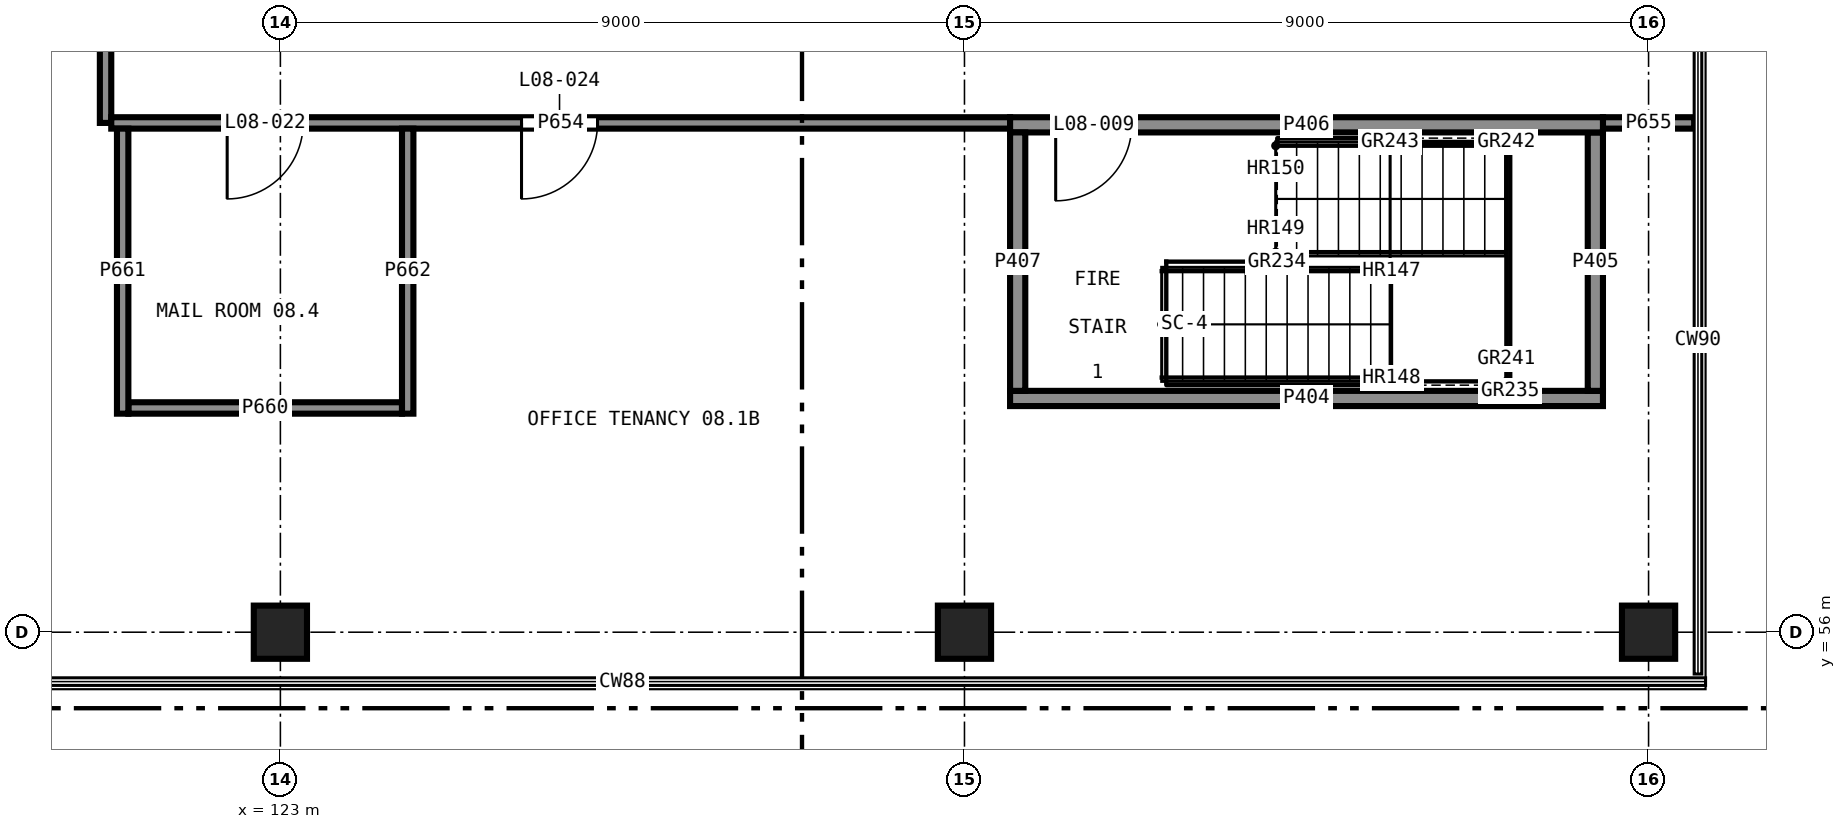
"""IFC4 building model, lengths in metres.
Left out: names, types, materials, properties, quantities, classifications, styles, units other than length and angle.
Written with IfcOpenShell. Run it as: python <this file> out.ifc"""

import sys

from ifc_helpers import new_model, si_unit, direction, frame, frame_2d, origin, origin_2d, place, context, subcontext, project, spatial, rectangle, extrude, element, fill, save


model = new_model("IFC4")
c1 = context("Model", 3, precision=1e-05, world=origin(), true_north=direction((0.0, 1.0)))
c2 = subcontext(c1, "Body", "Model", "MODEL_VIEW")
j1 = project(units=[si_unit("LENGTHUNIT", "METRE"), si_unit("PLANEANGLEUNIT", "RADIAN")], contexts=[c1])
p1 = place(None, origin())
s1 = spatial("IfcSite", under=j1, at=p1, CompositionType="ELEMENT")
p2 = place(p1, origin())
s2 = spatial("IfcBuilding", under=s1, at=p2, CompositionType="ELEMENT")
p3 = place(p2, frame((0.0, 0.0, 33.5)))
s3 = spatial("IfcBuildingStorey", under=s2, at=p3, CompositionType="ELEMENT", Elevation=33.5)
for number, where, z_axis, x_axis in (
    (1, (123.0, 56.0, 0.0), (0.0, 0.0, 1.0), (1.0, 0.0, 0.0)),
    (2, (132.0, 56.0, 0.0), (0.0, 0.0, 1.0), (1.0, 0.0, 0.0)),
    (3, (141.0, 56.0, 0.0), (0.0, 0.0, 1.0), (1.0, 0.0, 0.0)),
):
    element("IfcColumn", number, at=place(p3, frame(where, z_axis=z_axis, x_axis=x_axis)), inside=s3, PredefinedType="COLUMN", context=c2, shape_type="SweptSolid", body=[
        extrude(rectangle(XDim=0.7, YDim=0.7, at=origin_2d()), origin(), (0.0, 0.0, 1.0), 4.0),
    ])
p4 = place(p3, frame((132.6, 59.075, 0.0), z_axis=(0.0, 0.0, 1.0), x_axis=(1.0, 0.0, 0.0)))
e4 = element("IfcWall", 4, at=p4, inside=s3, PredefinedType="SHEAR", context=c2, shape_type="SweptSolid", body=[
    extrude(rectangle(XDim=7.8, YDim=0.2, at=frame_2d((3.9, 0.0))), origin(), (0.0, 0.0, 1.0), 3.75),
])
p5 = place(p3, frame((140.3, 59.175, 0.0), z_axis=(0.0, 0.0, 1.0), x_axis=(0.0, 1.0, 0.0)))
e5 = element("IfcWall", 5, at=p5, inside=s3, PredefinedType="SHEAR", context=c2, shape_type="SweptSolid", body=[
    extrude(rectangle(XDim=3.4, YDim=0.2, at=frame_2d((1.7, 0.0))), origin(), (0.0, 0.0, 1.0), 3.75),
])
p6 = place(p3, frame((140.4, 62.675, 0.0), z_axis=(0.0, 0.0, 1.0), x_axis=(-1.0, 0.0, 0.0)))
e6 = element("IfcWall", 6, at=p6, inside=s3, PredefinedType="SHEAR", context=c2, shape_type="SweptSolid", body=[
    extrude(rectangle(XDim=7.8, YDim=0.2, at=frame_2d((3.9, 0.0))), origin(), (0.0, 0.0, 1.0), 3.75),
])
p7 = place(p6, frame((6.2, 0.0, 0.0)))
e7 = element("IfcOpeningElement", 7, at=p7, cuts=e6, PredefinedType="OPENING", context=c2, shape_type="SweptSolid", body=[
    extrude(rectangle(XDim=1.0, YDim=2.1, at=frame_2d((0.5, 1.05))), frame((0.0, 0.11, 0.0), z_axis=(0.0, -1.0, 0.0), x_axis=(1.0, 0.0, 0.0)), (0.0, 0.0, 1.0), 0.22),
])
p8 = place(p3, frame((132.7, 62.575, 0.0), z_axis=(0.0, 0.0, 1.0), x_axis=(0.0, -1.0, 0.0)))
e8 = element("IfcWall", 8, at=p8, inside=s3, PredefinedType="SHEAR", context=c2, shape_type="SweptSolid", body=[
    extrude(rectangle(XDim=3.4, YDim=0.2, at=frame_2d((1.7, 0.0))), origin(), (0.0, 0.0, 1.0), 3.75),
])
p9 = place(p3, frame((120.7, 62.7, 0.0), z_axis=(0.0, 0.0, 1.0), x_axis=(0.0, 1.0, 0.0)))
e9 = element("IfcWall", 9, at=p9, inside=s3, PredefinedType="PARTITIONING", context=c2, shape_type="SweptSolid", body=[
    extrude(rectangle(XDim=22.525, YDim=0.15, at=frame_2d((11.263, 0.0))), origin(), (0.0, 0.0, 1.0), 3.75),
])
p10 = place(p9, frame((16.435, 0.0, 0.0)))
e10 = element("IfcOpeningElement", 10, at=p10, cuts=e9, PredefinedType="OPENING", context=c2, shape_type="SweptSolid", body=[
    extrude(rectangle(XDim=1.0, YDim=2.1, at=frame_2d((0.5, 1.05))), frame((0.0, 0.085, 0.0), z_axis=(0.0, -1.0, 0.0), x_axis=(1.0, 0.0, 0.0)), (0.0, 0.0, 1.0), 0.17),
])
p11 = place(p3, frame((132.6, 62.7, 0.0), z_axis=(0.0, 0.0, 1.0), x_axis=(-1.0, 0.0, 0.0)))
e11 = element("IfcWall", 11, at=p11, inside=s3, PredefinedType="PARTITIONING", context=c2, shape_type="SweptSolid", body=[
    extrude(rectangle(XDim=11.825, YDim=0.15, at=frame_2d((5.913, 0.0))), origin(), (0.0, 0.0, 1.0), 3.75),
])
p12 = place(p11, frame((9.3, 0.0, 0.0)))
e12 = element("IfcOpeningElement", 12, at=p12, cuts=e11, PredefinedType="OPENING", context=c2, shape_type="SweptSolid", body=[
    extrude(rectangle(XDim=1.0, YDim=2.1, at=frame_2d((0.5, 1.05))), frame((0.0, 0.085, 0.0), z_axis=(0.0, -1.0, 0.0), x_axis=(1.0, 0.0, 0.0)), (0.0, 0.0, 1.0), 0.17),
])
p13 = place(p11, frame((5.427, 0.0, 0.0)))
e13 = element("IfcOpeningElement", 13, at=p13, cuts=e11, PredefinedType="OPENING", context=c2, shape_type="SweptSolid", body=[
    extrude(rectangle(XDim=1.0, YDim=2.1, at=frame_2d((0.5, 1.05))), frame((0.0, 0.085, 0.0), z_axis=(0.0, -1.0, 0.0), x_axis=(1.0, 0.0, 0.0)), (0.0, 0.0, 1.0), 0.17),
])
p14 = place(p3, frame((141.6, 62.7, 0.0), z_axis=(0.0, 0.0, 1.0), x_axis=(-1.0, 0.0, 0.0)))
e14 = element("IfcWall", 14, at=p14, inside=s3, PredefinedType="PARTITIONING", context=c2, shape_type="SweptSolid", body=[
    extrude(rectangle(XDim=1.2, YDim=0.15, at=frame_2d((0.6, 0.0))), origin(), (0.0, 0.0, 1.0), 3.75),
])
p15 = place(p3, frame((121.0, 58.95, 0.0), z_axis=(0.0, 0.0, 1.0), x_axis=(1.0, 0.0, 0.0)))
e15 = element("IfcWall", 15, at=p15, inside=s3, PredefinedType="PARTITIONING", context=c2, shape_type="SweptSolid", body=[
    extrude(rectangle(XDim=3.6, YDim=0.15, at=frame_2d((1.8, 0.0))), origin(), (0.0, 0.0, 1.0), 3.75),
])
for number, where, z_axis, x_axis in (
    (16, (120.925, 62.625, 0.0), (0.0, 0.0, 1.0), (0.0, -1.0, 0.0)),
    (17, (124.675, 62.625, 0.0), (0.0, 0.0, 1.0), (0.0, -1.0, 0.0)),
):
    element("IfcWall", number, at=place(p3, frame(where, z_axis=z_axis, x_axis=x_axis)), inside=s3, PredefinedType="PARTITIONING", context=c2, shape_type="SweptSolid", body=[
        extrude(rectangle(XDim=3.75, YDim=0.15, at=frame_2d((1.875, 0.0))), origin(), (0.0, 0.0, 1.0), 3.75),
    ])
p16 = place(p7, origin())
e18 = element("IfcDoor", 18, at=p16, inside=s3, OperationType="SINGLE_SWING_LEFT", PredefinedType="DOOR", context=c2, shape_type="SweptSolid", body=[
    extrude(rectangle(XDim=1.0, YDim=2.1, at=frame_2d((0.5, 1.05))), frame((0.0, 0.025, 0.0), z_axis=(0.0, -1.0, 0.0), x_axis=(1.0, 0.0, 0.0)), (0.0, 0.0, 1.0), 0.05),
])
fill(e7, e18)
p17 = place(p12, origin())
e19 = element("IfcDoor", 19, at=p17, inside=s3, OperationType="SINGLE_SWING_LEFT", PredefinedType="DOOR", context=c2, shape_type="SweptSolid", body=[
    extrude(rectangle(XDim=1.0, YDim=2.1, at=frame_2d((0.5, 1.05))), frame((0.0, 0.025, 0.0), z_axis=(0.0, -1.0, 0.0), x_axis=(1.0, 0.0, 0.0)), (0.0, 0.0, 1.0), 0.05),
])
fill(e12, e19)
p18 = place(p13, origin())
e20 = element("IfcDoor", 20, at=p18, inside=s3, OperationType="SINGLE_SWING_LEFT", PredefinedType="DOOR", context=c2, shape_type="SweptSolid", body=[
    extrude(rectangle(XDim=1.0, YDim=2.1, at=frame_2d((0.5, 1.05))), frame((0.0, 0.025, 0.0), z_axis=(0.0, -1.0, 0.0), x_axis=(1.0, 0.0, 0.0)), (0.0, 0.0, 1.0), 0.05),
])
fill(e13, e20)
save(model, sys.argv[1])
